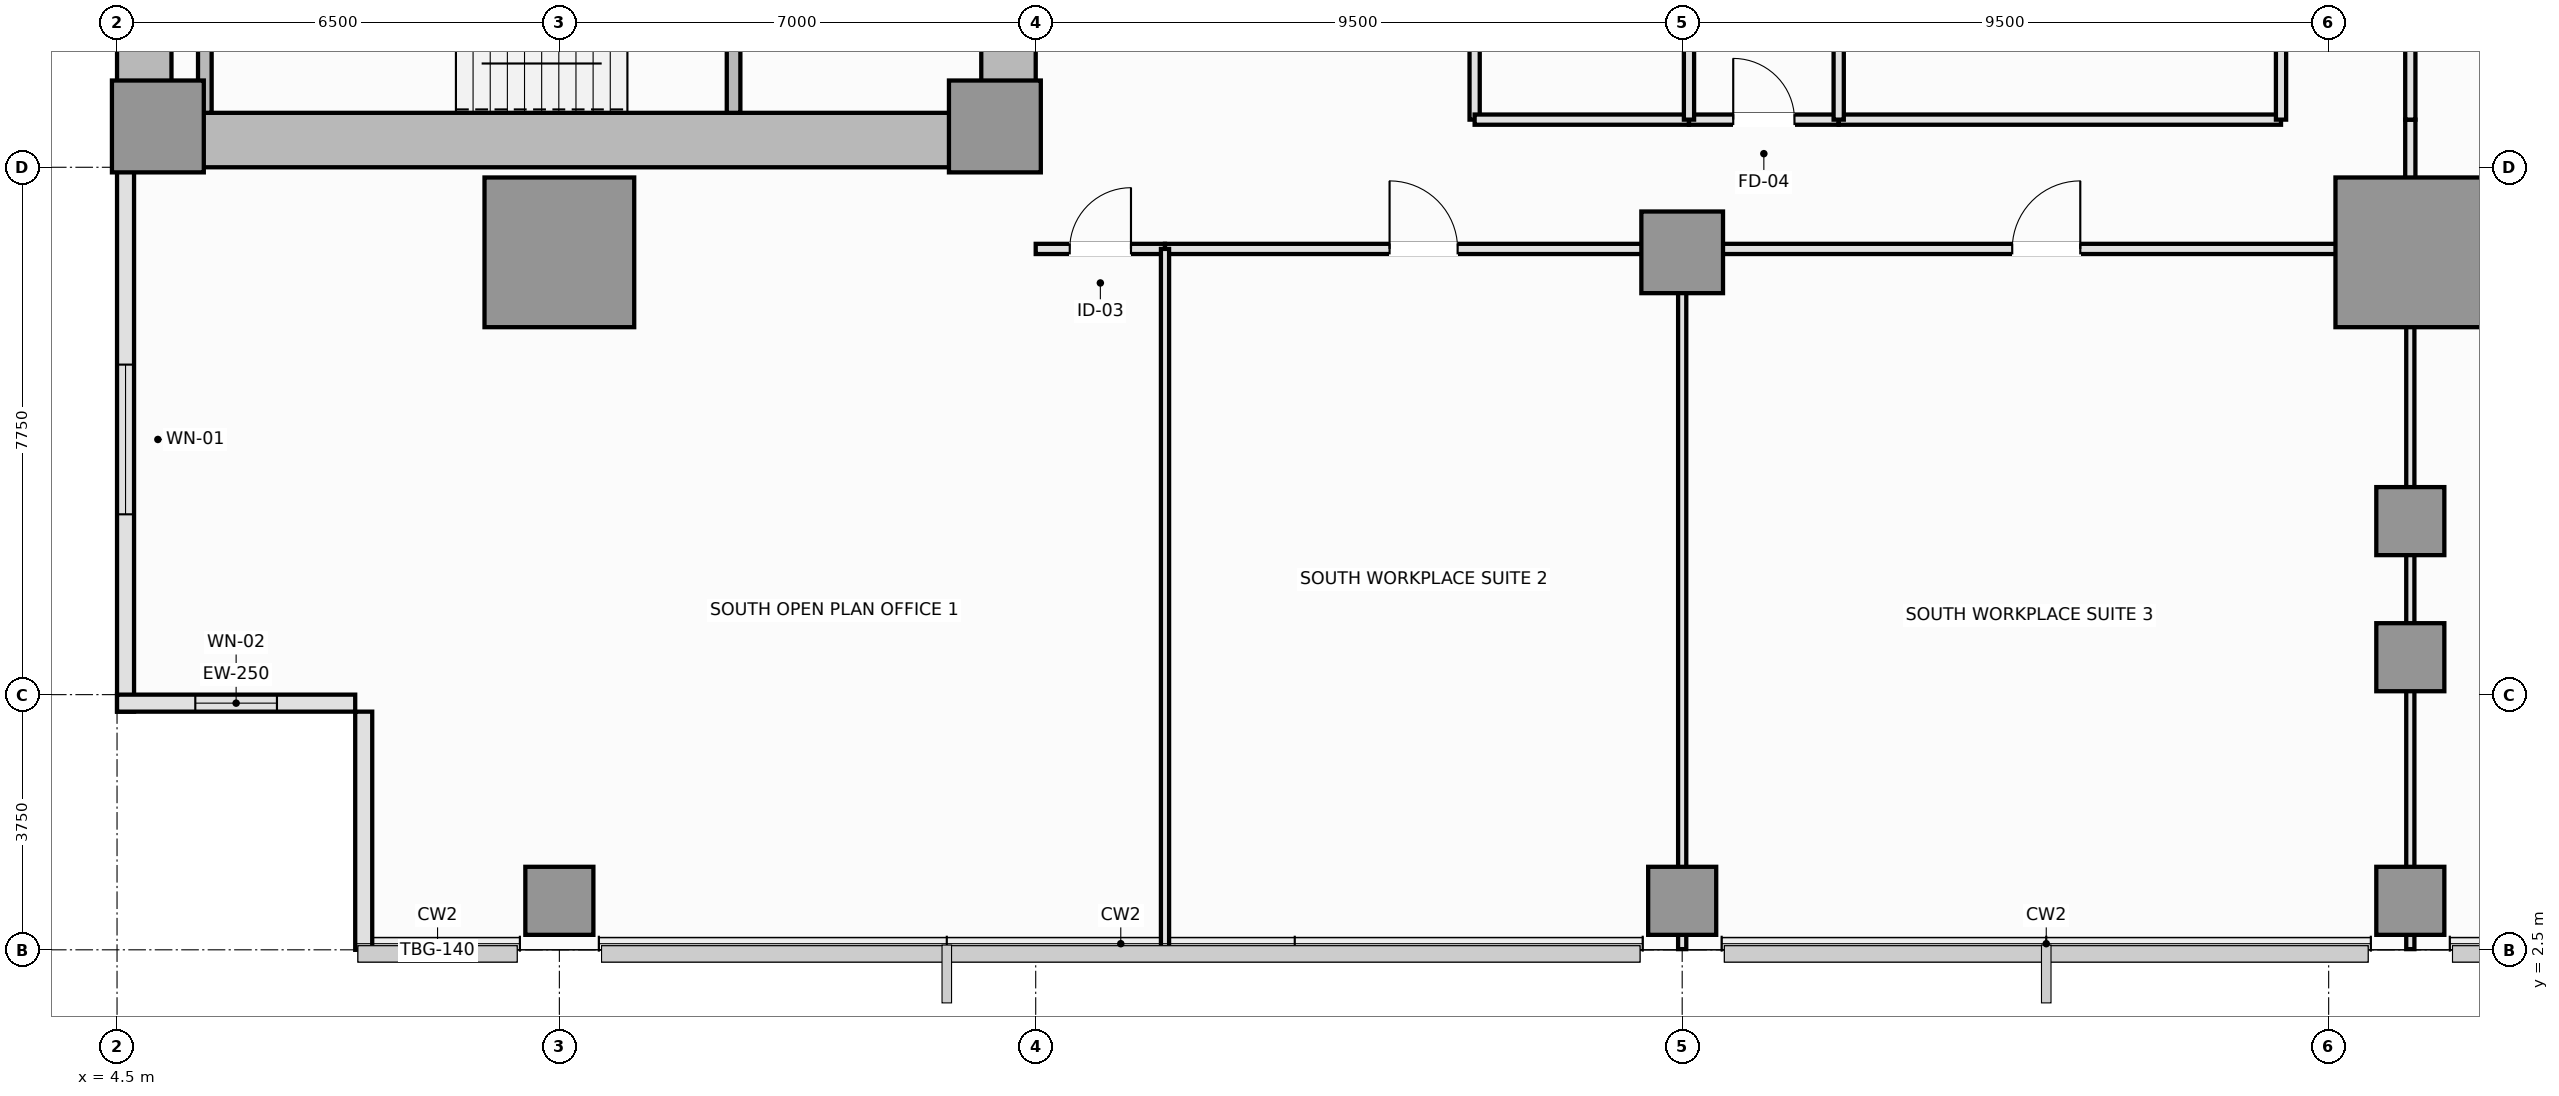
"""IFC4 building model, lengths in metres.
Left out: names, types, materials, properties, quantities, classifications, styles, units other than length and angle.
Written with IfcOpenShell. Run it as: python <this file> out.ifc"""

import sys

from ifc_helpers import new_model, si_unit, direction, frame, frame_2d, origin, origin_2d, place, context, subcontext, project, spatial, rectangle, extrude, element, fill, save


model = new_model("IFC4")
c1 = context("Model", 3, precision=1e-05, world=origin(), true_north=direction((0.0, 1.0)))
c2 = subcontext(c1, "Body", "Model", "MODEL_VIEW")
j1 = project(units=[si_unit("LENGTHUNIT", "METRE"), si_unit("PLANEANGLEUNIT", "RADIAN")], contexts=[c1])
p1 = place(None, origin())
s1 = spatial("IfcSite", under=j1, at=p1, CompositionType="ELEMENT")
p2 = place(p1, origin())
s2 = spatial("IfcBuilding", under=s1, at=p2, CompositionType="ELEMENT")
p3 = place(p2, frame((0.0, 0.0, 32.7)))
s3 = spatial("IfcBuildingStorey", under=s2, at=p3, CompositionType="ELEMENT", Elevation=32.7)
p4 = place(p3, frame((4.5, 14.4, 0.0), z_axis=(0.0, 0.0, 1.0), x_axis=(1.0, 0.0, 0.0)))
e1 = element("IfcWall", 1, at=p4, inside=s3, PredefinedType="SHEAR", context=c2, shape_type="SweptSolid", body=[
    extrude(rectangle(XDim=13.5, YDim=0.8, at=frame_2d((6.75, 0.0))), origin(), (0.0, 0.0, 1.0), 3.55),
])
p5 = place(p3, frame((4.9, 14.8, 0.0), z_axis=(0.0, 0.0, 1.0), x_axis=(0.0, 1.0, 0.0)))
e2 = element("IfcWall", 2, at=p5, inside=s3, PredefinedType="SHEAR", context=c2, shape_type="SweptSolid", body=[
    extrude(rectangle(XDim=20.9, YDim=0.8, at=frame_2d((10.45, 0.0))), origin(), (0.0, 0.0, 1.0), 3.55),
])
p6 = place(p3, frame((17.6, 14.8, 0.0), z_axis=(0.0, 0.0, 1.0), x_axis=(0.0, 1.0, 0.0)))
e3 = element("IfcWall", 3, at=p6, inside=s3, PredefinedType="SHEAR", context=c2, shape_type="SweptSolid", body=[
    extrude(rectangle(XDim=8.65, YDim=0.8, at=frame_2d((4.325, 0.0))), origin(), (0.0, 0.0, 1.0), 3.55),
])
p7 = place(p6, frame((4.1, 0.0, 0.0)))
e4 = element("IfcOpeningElement", 4, at=p7, cuts=e3, PredefinedType="OPENING", context=c2, shape_type="SweptSolid", body=[
    extrude(rectangle(XDim=1.1, YDim=2.15, at=frame_2d((0.55, 1.075))), frame((0.0, 0.41, 0.0), z_axis=(0.0, -1.0, 0.0), x_axis=(1.0, 0.0, 0.0)), (0.0, 0.0, 1.0), 0.82),
])
for number, where, z_axis, x_axis in (
    (5, (5.1, 14.6, 0.0), (0.0, 0.0, 1.0), (1.0, 0.0, 0.0)),
    (6, (17.4, 14.6, 0.0), (0.0, 0.0, 1.0), (1.0, 0.0, 0.0)),
):
    element("IfcColumn", number, at=place(p3, frame(where, z_axis=z_axis, x_axis=x_axis)), inside=s3, PredefinedType="PILASTER", context=c2, shape_type="SweptSolid", body=[
        extrude(rectangle(XDim=1.35, YDim=1.35, at=origin_2d()), origin(), (0.0, 0.0, 1.0), 3.55),
    ])
for number, where, z_axis, x_axis in (
    (7, (11.0, 12.75, 0.0), (0.0, 0.0, 1.0), (1.0, 0.0, 0.0)),
    (8, (38.2, 12.75, 0.0), (0.0, 0.0, 1.0), (1.0, 0.0, 0.0)),
):
    element("IfcColumn", number, at=place(p3, frame(where, z_axis=z_axis, x_axis=x_axis)), inside=s3, PredefinedType="COLUMN", context=c2, shape_type="SweptSolid", body=[
        extrude(rectangle(XDim=2.2, YDim=2.2, at=origin_2d()), origin(), (0.0, 0.0, 1.0), 3.55),
    ])
p8 = place(p3, frame((27.5, 12.75, 0.0), z_axis=(0.0, 0.0, 1.0), x_axis=(1.0, 0.0, 0.0)))
e9 = element("IfcColumn", 9, at=p8, inside=s3, PredefinedType="COLUMN", context=c2, shape_type="SweptSolid", body=[
    extrude(rectangle(XDim=1.2, YDim=1.2, at=origin_2d()), origin(), (0.0, 0.0, 1.0), 3.55),
])
for number, where, z_axis, x_axis in (
    (10, (38.2, 6.8, 0.0), (0.0, 0.0, 1.0), (1.0, 0.0, 0.0)),
    (11, (38.2, 8.8, 0.0), (0.0, 0.0, 1.0), (1.0, 0.0, 0.0)),
    (12, (11.0, 3.22, 0.0), (0.0, 0.0, 1.0), (1.0, 0.0, 0.0)),
    (13, (27.5, 3.22, 0.0), (0.0, 0.0, 1.0), (1.0, 0.0, 0.0)),
    (14, (38.2, 3.22, 0.0), (0.0, 0.0, 1.0), (1.0, 0.0, 0.0)),
):
    element("IfcColumn", number, at=place(p3, frame(where, z_axis=z_axis, x_axis=x_axis)), inside=s3, PredefinedType="COLUMN", context=c2, shape_type="SweptSolid", body=[
        extrude(rectangle(XDim=1.0, YDim=1.0, at=origin_2d()), origin(), (0.0, 0.0, 1.0), 3.55),
    ])
p9 = place(p3, frame((4.625, 14.0, 0.0), z_axis=(0.0, 0.0, 1.0), x_axis=(0.0, -1.0, 0.0)))
e15 = element("IfcWall", 15, at=p9, inside=s3, PredefinedType="SOLIDWALL", context=c2, shape_type="SweptSolid", body=[
    extrude(rectangle(XDim=8.0, YDim=0.25, at=frame_2d((4.0, 0.0))), origin(), (0.0, 0.0, 1.0), 3.37),
])
p10 = place(p9, frame((2.9, 0.0, 0.9)))
e16 = element("IfcOpeningElement", 16, at=p10, cuts=e15, PredefinedType="OPENING", context=c2, shape_type="SweptSolid", body=[
    extrude(rectangle(XDim=2.2, YDim=1.8, at=frame_2d((1.1, 0.9))), frame((0.0, 0.135, 0.0), z_axis=(0.0, -1.0, 0.0), x_axis=(1.0, 0.0, 0.0)), (0.0, 0.0, 1.0), 0.27),
])
p11 = place(p3, frame((4.5, 6.125, 0.0), z_axis=(0.0, 0.0, 1.0), x_axis=(1.0, 0.0, 0.0)))
e17 = element("IfcWall", 17, at=p11, inside=s3, PredefinedType="SOLIDWALL", context=c2, shape_type="SweptSolid", body=[
    extrude(rectangle(XDim=3.5, YDim=0.25, at=frame_2d((1.75, 0.0))), origin(), (0.0, 0.0, 1.0), 3.37),
])
p12 = place(p11, frame((1.15, 0.0, 0.9)))
e18 = element("IfcOpeningElement", 18, at=p12, cuts=e17, PredefinedType="OPENING", context=c2, shape_type="SweptSolid", body=[
    extrude(rectangle(XDim=1.2, YDim=1.8, at=frame_2d((0.6, 0.9))), frame((0.0, 0.135, 0.0), z_axis=(0.0, -1.0, 0.0), x_axis=(1.0, 0.0, 0.0)), (0.0, 0.0, 1.0), 0.27),
])
p13 = place(p3, frame((8.125, 6.0, 0.0), z_axis=(0.0, 0.0, 1.0), x_axis=(0.0, -1.0, 0.0)))
e19 = element("IfcWall", 19, at=p13, inside=s3, PredefinedType="SOLIDWALL", context=c2, shape_type="SweptSolid", body=[
    extrude(rectangle(XDim=3.5, YDim=0.25, at=frame_2d((1.75, 0.0))), origin(), (0.0, 0.0, 1.0), 3.37),
])
p14 = place(p3, frame((5.79, 14.8, 0.0), z_axis=(0.0, 0.0, 1.0), x_axis=(0.0, 1.0, 0.0)))
e20 = element("IfcWall", 20, at=p14, inside=s3, PredefinedType="SOLIDWALL", context=c2, shape_type="SweptSolid", body=[
    extrude(rectangle(XDim=3.05, YDim=0.2, at=frame_2d((1.525, 0.0))), origin(), (0.0, 0.0, 1.0), 3.55),
])
p15 = place(p3, frame((13.56, 14.8, 0.0), z_axis=(0.0, 0.0, 1.0), x_axis=(0.0, 1.0, 0.0)))
e21 = element("IfcWall", 21, at=p15, inside=s3, PredefinedType="SOLIDWALL", context=c2, shape_type="SweptSolid", body=[
    extrude(rectangle(XDim=3.05, YDim=0.2, at=frame_2d((1.525, 0.0))), origin(), (0.0, 0.0, 1.0), 3.55),
])
p16 = place(p15, frame((0.95, 0.0, 0.0)))
e22 = element("IfcOpeningElement", 22, at=p16, cuts=e21, PredefinedType="OPENING", context=c2, shape_type="SweptSolid", body=[
    extrude(rectangle(XDim=1.15, YDim=2.15, at=frame_2d((0.575, 1.075))), frame((0.0, 0.11, 0.0), z_axis=(0.0, -1.0, 0.0), x_axis=(1.0, 0.0, 0.0)), (0.0, 0.0, 1.0), 0.22),
])
p17 = place(p3, frame((24.45, 14.7, 0.0), z_axis=(0.0, 0.0, 1.0), x_axis=(0.0, 1.0, 0.0)))
e23 = element("IfcWall", 23, at=p17, inside=s3, PredefinedType="PLUMBINGWALL", context=c2, shape_type="SweptSolid", body=[
    extrude(rectangle(XDim=3.1, YDim=0.15, at=frame_2d((1.55, 0.0))), origin(), (0.0, 0.0, 1.0), 3.37),
])
p18 = place(p17, frame((1.1, 0.0, 0.0)))
e24 = element("IfcOpeningElement", 24, at=p18, cuts=e23, PredefinedType="OPENING", context=c2, shape_type="SweptSolid", body=[
    extrude(rectangle(XDim=0.9, YDim=2.1, at=frame_2d((0.45, 1.05))), frame((0.0, 0.085, 0.0), z_axis=(0.0, -1.0, 0.0), x_axis=(1.0, 0.0, 0.0)), (0.0, 0.0, 1.0), 0.17),
])
p19 = place(p3, frame((24.45, 14.7, 0.0), z_axis=(0.0, 0.0, 1.0), x_axis=(1.0, 0.0, 0.0)))
e25 = element("IfcWall", 25, at=p19, inside=s3, PredefinedType="PLUMBINGWALL", context=c2, shape_type="SweptSolid", body=[
    extrude(rectangle(XDim=3.15, YDim=0.15, at=frame_2d((1.575, 0.0))), origin(), (0.0, 0.0, 1.0), 3.37),
])
p20 = place(p3, frame((27.6, 14.7, 0.0), z_axis=(0.0, 0.0, 1.0), x_axis=(1.0, 0.0, 0.0)))
e26 = element("IfcWall", 26, at=p20, inside=s3, PredefinedType="PLUMBINGWALL", context=c2, shape_type="SweptSolid", body=[
    extrude(rectangle(XDim=2.2, YDim=0.15, at=frame_2d((1.1, 0.0))), origin(), (0.0, 0.0, 1.0), 3.37),
])
p21 = place(p20, frame((0.65, 0.0, 0.0)))
e27 = element("IfcOpeningElement", 27, at=p21, cuts=e26, PredefinedType="OPENING", context=c2, shape_type="SweptSolid", body=[
    extrude(rectangle(XDim=0.9, YDim=2.1, at=frame_2d((0.45, 1.05))), frame((0.0, 0.085, 0.0), z_axis=(0.0, -1.0, 0.0), x_axis=(1.0, 0.0, 0.0)), (0.0, 0.0, 1.0), 0.17),
])
p22 = place(p3, frame((29.8, 14.7, 0.0), z_axis=(0.0, 0.0, 1.0), x_axis=(1.0, 0.0, 0.0)))
e28 = element("IfcWall", 28, at=p22, inside=s3, PredefinedType="PARTITIONING", context=c2, shape_type="SweptSolid", body=[
    extrude(rectangle(XDim=6.5, YDim=0.15, at=frame_2d((3.25, 0.0))), origin(), (0.0, 0.0, 1.0), 3.37),
])
p23 = place(p3, frame((18.0, 12.8, 0.0), z_axis=(0.0, 0.0, 1.0), x_axis=(1.0, 0.0, 0.0)))
e29 = element("IfcWall", 29, at=p23, inside=s3, PredefinedType="PARTITIONING", context=c2, shape_type="SweptSolid", body=[
    extrude(rectangle(XDim=1.9, YDim=0.15, at=frame_2d((0.95, 0.0))), origin(), (0.0, 0.0, 1.0), 2.72),
])
p24 = place(p23, frame((0.5, 0.0, 0.0)))
e30 = element("IfcOpeningElement", 30, at=p24, cuts=e29, PredefinedType="OPENING", context=c2, shape_type="SweptSolid", body=[
    extrude(rectangle(XDim=0.9, YDim=2.1, at=frame_2d((0.45, 1.05))), frame((0.0, 0.085, 0.0), z_axis=(0.0, -1.0, 0.0), x_axis=(1.0, 0.0, 0.0)), (0.0, 0.0, 1.0), 0.17),
])
p25 = place(p3, frame((19.9, 12.8, 0.0), z_axis=(0.0, 0.0, 1.0), x_axis=(1.0, 0.0, 0.0)))
e31 = element("IfcWall", 31, at=p25, inside=s3, PredefinedType="PARTITIONING", context=c2, shape_type="SweptSolid", body=[
    extrude(rectangle(XDim=7.6, YDim=0.15, at=frame_2d((3.8, 0.0))), origin(), (0.0, 0.0, 1.0), 2.72),
])
p26 = place(p25, frame((3.3, 0.0, 0.0)))
e32 = element("IfcOpeningElement", 32, at=p26, cuts=e31, PredefinedType="OPENING", context=c2, shape_type="SweptSolid", body=[
    extrude(rectangle(XDim=1.0, YDim=2.15, at=frame_2d((0.5, 1.075))), frame((0.0, 0.085, 0.0), z_axis=(0.0, -1.0, 0.0), x_axis=(1.0, 0.0, 0.0)), (0.0, 0.0, 1.0), 0.17),
])
p27 = place(p3, frame((27.5, 12.8, 0.0), z_axis=(0.0, 0.0, 1.0), x_axis=(1.0, 0.0, 0.0)))
e33 = element("IfcWall", 33, at=p27, inside=s3, PredefinedType="PARTITIONING", context=c2, shape_type="SweptSolid", body=[
    extrude(rectangle(XDim=10.7, YDim=0.15, at=frame_2d((5.35, 0.0))), origin(), (0.0, 0.0, 1.0), 2.72),
])
p28 = place(p27, frame((4.85, 0.0, 0.0)))
e34 = element("IfcOpeningElement", 34, at=p28, cuts=e33, PredefinedType="OPENING", context=c2, shape_type="SweptSolid", body=[
    extrude(rectangle(XDim=1.0, YDim=2.15, at=frame_2d((0.5, 1.075))), frame((0.0, 0.085, 0.0), z_axis=(0.0, -1.0, 0.0), x_axis=(1.0, 0.0, 0.0)), (0.0, 0.0, 1.0), 0.17),
])
p29 = place(p3, frame((38.2, 12.8, 0.0), z_axis=(0.0, 0.0, 1.0), x_axis=(0.0, 1.0, 0.0)))
e35 = element("IfcWall", 35, at=p29, inside=s3, PredefinedType="PARTITIONING", context=c2, shape_type="SweptSolid", body=[
    extrude(rectangle(XDim=1.9, YDim=0.15, at=frame_2d((0.95, 0.0))), origin(), (0.0, 0.0, 1.0), 2.82),
])
p30 = place(p3, frame((36.3, 14.7, 0.0), z_axis=(0.0, 0.0, 1.0), x_axis=(0.0, 1.0, 0.0)))
e36 = element("IfcWall", 36, at=p30, inside=s3, PredefinedType="PARTITIONING", context=c2, shape_type="SweptSolid", body=[
    extrude(rectangle(XDim=3.1, YDim=0.15, at=frame_2d((1.55, 0.0))), origin(), (0.0, 0.0, 1.0), 3.37),
])
p31 = place(p30, frame((1.05, 0.0, 0.0)))
e37 = element("IfcOpeningElement", 37, at=p31, cuts=e36, PredefinedType="OPENING", context=c2, shape_type="SweptSolid", body=[
    extrude(rectangle(XDim=1.0, YDim=2.15, at=frame_2d((0.5, 1.075))), frame((0.0, 0.085, 0.0), z_axis=(0.0, -1.0, 0.0), x_axis=(1.0, 0.0, 0.0)), (0.0, 0.0, 1.0), 0.17),
])
p32 = place(p3, frame((38.2, 14.7, 0.0), z_axis=(0.0, 0.0, 1.0), x_axis=(0.0, 1.0, 0.0)))
e38 = element("IfcWall", 38, at=p32, inside=s3, PredefinedType="PARTITIONING", context=c2, shape_type="SweptSolid", body=[
    extrude(rectangle(XDim=3.8, YDim=0.15, at=frame_2d((1.9, 0.0))), origin(), (0.0, 0.0, 1.0), 2.82),
])
p33 = place(p32, frame((1.4, 0.0, 0.0)))
e39 = element("IfcOpeningElement", 39, at=p33, cuts=e38, PredefinedType="OPENING", context=c2, shape_type="SweptSolid", body=[
    extrude(rectangle(XDim=1.0, YDim=2.15, at=frame_2d((0.5, 1.075))), frame((0.0, 0.085, 0.0), z_axis=(0.0, -1.0, 0.0), x_axis=(1.0, 0.0, 0.0)), (0.0, 0.0, 1.0), 0.17),
])
for number, where, z_axis, x_axis in (
    (40, (27.6, 14.7, 0.0), (0.0, 0.0, 1.0), (0.0, 1.0, 0.0)),
    (41, (29.8, 14.7, 0.0), (0.0, 0.0, 1.0), (0.0, 1.0, 0.0)),
):
    element("IfcWall", number, at=place(p3, frame(where, z_axis=z_axis, x_axis=x_axis)), inside=s3, PredefinedType="PLUMBINGWALL", context=c2, shape_type="SweptSolid", body=[
        extrude(rectangle(XDim=3.1, YDim=0.15, at=frame_2d((1.55, 0.0))), origin(), (0.0, 0.0, 1.0), 3.37),
    ])
p34 = place(p3, frame((19.9, 2.51, 0.0), z_axis=(0.0, 0.0, 1.0), x_axis=(0.0, 1.0, 0.0)))
e42 = element("IfcWall", 42, at=p34, inside=s3, PredefinedType="PARTITIONING", context=c2, shape_type="SweptSolid", body=[
    extrude(rectangle(XDim=10.29, YDim=0.12, at=frame_2d((5.145, 0.0))), origin(), (0.0, 0.0, 1.0), 3.37),
])
for number, where, z_axis, x_axis in (
    (43, (27.5, 2.51, 0.0), (0.0, 0.0, 1.0), (0.0, 1.0, 0.0)),
    (44, (38.2, 2.51, 0.0), (0.0, 0.0, 1.0), (0.0, 1.0, 0.0)),
):
    element("IfcWall", number, at=place(p3, frame(where, z_axis=z_axis, x_axis=x_axis)), inside=s3, PredefinedType="PARTITIONING", context=c2, shape_type="SweptSolid", body=[
        extrude(rectangle(XDim=10.29, YDim=0.12, at=frame_2d((5.145, 0.0))), origin(), (0.0, 0.0, 1.0), 2.82),
    ])
p35 = place(p10, origin())
e45 = element("IfcWindow", 45, at=p35, inside=s3, PartitioningType="SINGLE_PANEL", PredefinedType="WINDOW", context=c2, shape_type="SweptSolid", body=[
    extrude(rectangle(XDim=2.2, YDim=1.8, at=frame_2d((1.1, 0.9))), frame((0.0, 0.03, 0.0), z_axis=(0.0, -1.0, 0.0), x_axis=(1.0, 0.0, 0.0)), (0.0, 0.0, 1.0), 0.06),
])
fill(e16, e45)
p36 = place(p12, origin())
e46 = element("IfcWindow", 46, at=p36, inside=s3, PartitioningType="SINGLE_PANEL", PredefinedType="WINDOW", context=c2, shape_type="SweptSolid", body=[
    extrude(rectangle(XDim=1.2, YDim=1.8, at=frame_2d((0.6, 0.9))), frame((0.0, 0.03, 0.0), z_axis=(0.0, -1.0, 0.0), x_axis=(1.0, 0.0, 0.0)), (0.0, 0.0, 1.0), 0.06),
])
fill(e18, e46)
p37 = place(p21, origin())
e47 = element("IfcDoor", 47, at=p37, inside=s3, OperationType="SINGLE_SWING_LEFT", PredefinedType="DOOR", context=c2, shape_type="SweptSolid", body=[
    extrude(rectangle(XDim=0.9, YDim=2.1, at=frame_2d((0.45, 1.05))), frame((0.0, 0.025, 0.0), z_axis=(0.0, -1.0, 0.0), x_axis=(1.0, 0.0, 0.0)), (0.0, 0.0, 1.0), 0.05),
])
fill(e27, e47)
p38 = place(p24, origin())
e48 = element("IfcDoor", 48, at=p38, inside=s3, OperationType="SINGLE_SWING_RIGHT", PredefinedType="DOOR", context=c2, shape_type="SweptSolid", body=[
    extrude(rectangle(XDim=0.9, YDim=2.1, at=frame_2d((0.45, 1.05))), frame((0.0, 0.025, 0.0), z_axis=(0.0, -1.0, 0.0), x_axis=(1.0, 0.0, 0.0)), (0.0, 0.0, 1.0), 0.05),
])
fill(e30, e48)
p39 = place(p26, origin())
e49 = element("IfcDoor", 49, at=p39, inside=s3, OperationType="SINGLE_SWING_LEFT", PredefinedType="DOOR", context=c2, shape_type="SweptSolid", body=[
    extrude(rectangle(XDim=1.0, YDim=2.15, at=frame_2d((0.5, 1.075))), frame((0.0, 0.025, 0.0), z_axis=(0.0, -1.0, 0.0), x_axis=(1.0, 0.0, 0.0)), (0.0, 0.0, 1.0), 0.05),
])
fill(e32, e49)
p40 = place(p28, origin())
e50 = element("IfcDoor", 50, at=p40, inside=s3, OperationType="SINGLE_SWING_RIGHT", PredefinedType="DOOR", context=c2, shape_type="SweptSolid", body=[
    extrude(rectangle(XDim=1.0, YDim=2.15, at=frame_2d((0.5, 1.075))), frame((0.0, 0.025, 0.0), z_axis=(0.0, -1.0, 0.0), x_axis=(1.0, 0.0, 0.0)), (0.0, 0.0, 1.0), 0.05),
])
fill(e34, e50)
save(model, sys.argv[1])
